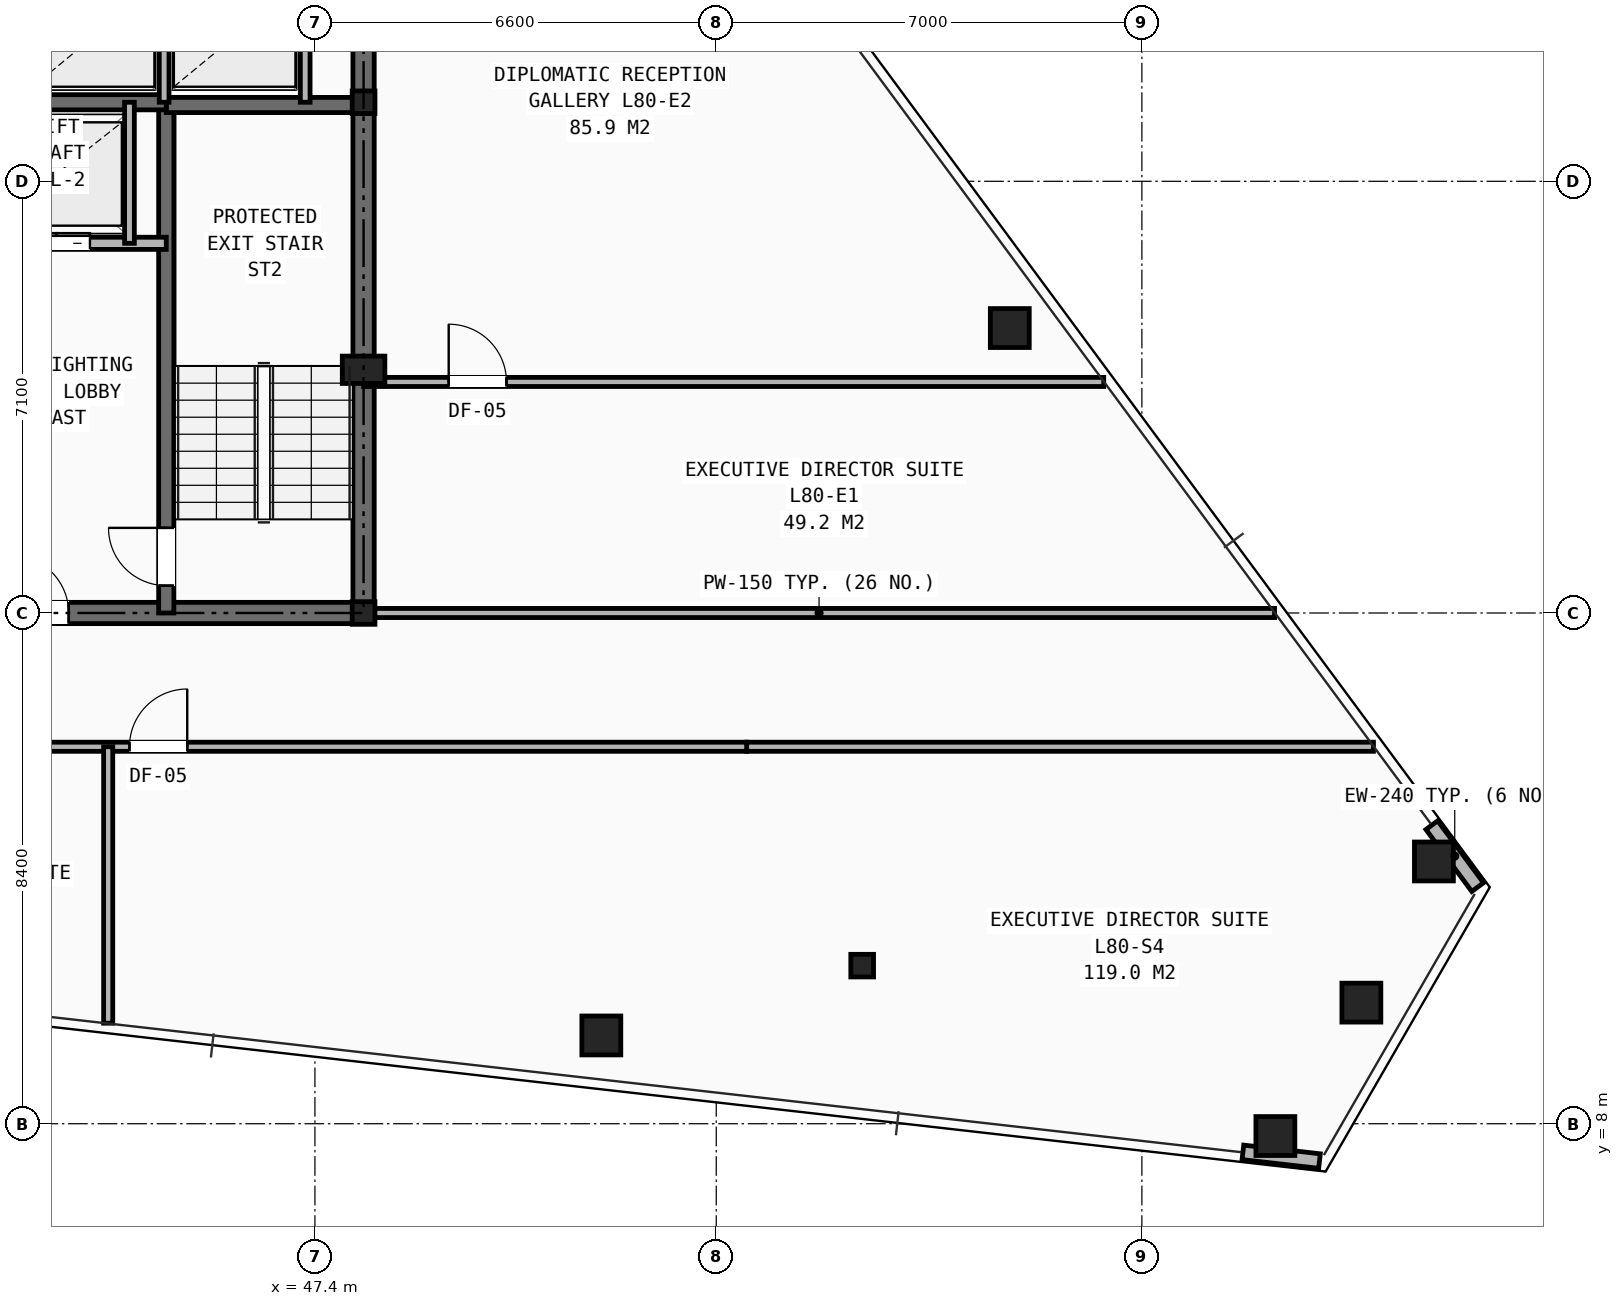
"""IFC4 building model, lengths in metres.
Left out: names, types, materials, properties, quantities, classifications, styles, units other than length and angle.
Written with IfcOpenShell. Run it as: python <this file> out.ifc"""

import sys

from ifc_helpers import new_model, si_unit, direction, frame, frame_2d, origin, origin_2d, place, context, subcontext, project, spatial, rectangle, hollow_rectangle, i_section, extrude, element, fill, save


model = new_model("IFC4")
c1 = context("Model", 3, precision=1e-05, world=origin(), true_north=direction((0.0, 1.0)))
c2 = subcontext(c1, "Body", "Model", "MODEL_VIEW")
j1 = project(units=[si_unit("LENGTHUNIT", "METRE"), si_unit("PLANEANGLEUNIT", "RADIAN")], contexts=[c1])
p1 = place(None, origin())
s1 = spatial("IfcSite", under=j1, at=p1, CompositionType="ELEMENT")
p2 = place(p1, origin())
s2 = spatial("IfcBuilding", under=s1, at=p2, CompositionType="ELEMENT")
p3 = place(p2, frame((0.0, 0.0, 283.0)))
s3 = spatial("IfcBuildingStorey", under=s2, at=p3, CompositionType="ELEMENT", Elevation=283.0)
for number, where, z_axis, x_axis in (
    (1, (48.2, 16.4, 0.0), (0.0, 0.0, 1.0), (1.0, 0.0, 0.0)),
    (2, (48.2, 24.8, 0.0), (0.0, 0.0, 1.0), (1.0, 0.0, 0.0)),
    (3, (56.4, 10.6, 0.0), (0.0, 0.0, 1.0), (1.0, 0.0, 0.0)),
):
    element("IfcColumn", number, at=place(p3, frame(where, z_axis=z_axis, x_axis=x_axis)), inside=s3, PredefinedType="COLUMN", context=c2, shape_type="SweptSolid", body=[
        extrude(i_section(OverallWidth=0.374, OverallDepth=0.372, WebThickness=0.016, FlangeThickness=0.026, at=origin_2d()), origin(), (0.0, 0.0, 1.0), 3.5),
    ])
p4 = place(p3, frame((48.2, 20.4, 0.0), z_axis=(0.0, 0.0, 1.0), x_axis=(1.0, 0.0, 0.0)))
e4 = element("IfcColumn", 4, at=p4, inside=s3, PredefinedType="PILASTER", context=c2, shape_type="SweptSolid", body=[
    extrude(rectangle(XDim=0.7, YDim=0.45, at=origin_2d()), origin(), (0.0, 0.0, 1.0), 3.5),
])
for number, where, z_axis, x_axis in (
    (5, (52.11, 9.452, 0.0), (0.0, 0.0, 1.0), (1.0, 0.0, 0.0)),
    (6, (63.195, 7.798, 0.0), (0.0, 0.0, 1.0), (1.0, 0.0, 0.0)),
    (7, (64.61, 9.992, 0.0), (0.0, 0.0, 1.0), (1.0, 0.0, 0.0)),
    (8, (65.802, 12.313, 0.0), (0.0, 0.0, 1.0), (1.0, 0.0, 0.0)),
    (9, (58.827, 21.086, 0.0), (0.0, 0.0, 1.0), (1.0, 0.0, 0.0)),
):
    element("IfcColumn", number, at=place(p3, frame(where, z_axis=z_axis, x_axis=x_axis)), inside=s3, PredefinedType="COLUMN", context=c2, shape_type="SweptSolid", body=[
        extrude(hollow_rectangle(XDim=0.64, YDim=0.64, WallThickness=0.045, at=origin_2d()), origin(), (0.0, 0.0, 1.0), 3.5),
    ])
p5 = place(p3, frame((62.661, 7.529, 0.0), z_axis=(0.0, 0.0, 1.0), x_axis=(0.993610655419, -0.11286215237, 0.0)))
e10 = element("IfcWall", 10, at=p5, inside=s3, PredefinedType="SHEAR", context=c2, shape_type="SweptSolid", body=[
    extrude(rectangle(XDim=1.268, YDim=0.24, at=frame_2d((0.634, 0.0))), origin(), (0.0, 0.0, 1.0), 2.623),
])
p6 = place(p3, frame((66.522, 11.891, 0.0), z_axis=(0.0, 0.0, 1.0), x_axis=(-0.594499388503, 0.804096062091, 0.0)))
e11 = element("IfcWall", 11, at=p6, inside=s3, PredefinedType="SHEAR", context=c2, shape_type="SweptSolid", body=[
    extrude(rectangle(XDim=1.267, YDim=0.24, at=frame_2d((0.634, 0.0))), origin(), (0.0, 0.0, 1.0), 2.623),
])
p7 = place(p3, frame((31.8, 16.4, 0.0), z_axis=(0.0, 0.0, 1.0), x_axis=(1.0, 0.0, 0.0)))
e12 = element("IfcWall", 12, at=p7, inside=s3, PredefinedType="SHEAR", context=c2, shape_type="SweptSolid", body=[
    extrude(rectangle(XDim=16.4, YDim=0.35, at=frame_2d((8.2, 0.0))), origin(), (0.0, 0.0, 1.0), 3.25),
])
p8 = place(p7, frame((7.75, 0.0, 0.0)))
e13 = element("IfcOpeningElement", 13, at=p8, cuts=e12, PredefinedType="OPENING", context=c2, shape_type="SweptSolid", body=[
    extrude(rectangle(XDim=0.9, YDim=2.1, at=frame_2d((0.45, 1.05))), frame((0.0, 0.185, 0.0), z_axis=(0.0, -1.0, 0.0), x_axis=(1.0, 0.0, 0.0)), (0.0, 0.0, 1.0), 0.37),
])
p9 = place(p7, frame((4.2, 0.0, 0.0)))
e14 = element("IfcOpeningElement", 14, at=p9, cuts=e12, PredefinedType="OPENING", context=c2, shape_type="SweptSolid", body=[
    extrude(rectangle(XDim=0.95, YDim=2.1, at=frame_2d((0.475, 1.05))), frame((0.0, 0.185, 0.0), z_axis=(0.0, -1.0, 0.0), x_axis=(1.0, 0.0, 0.0)), (0.0, 0.0, 1.0), 0.37),
])
p10 = place(p7, frame((10.6, 0.0, 0.0)))
e15 = element("IfcOpeningElement", 15, at=p10, cuts=e12, PredefinedType="OPENING", context=c2, shape_type="SweptSolid", body=[
    extrude(rectangle(XDim=0.95, YDim=2.1, at=frame_2d((0.475, 1.05))), frame((0.0, 0.185, 0.0), z_axis=(0.0, -1.0, 0.0), x_axis=(1.0, 0.0, 0.0)), (0.0, 0.0, 1.0), 0.37),
])
p11 = place(p3, frame((48.2, 16.4, 0.0), z_axis=(0.0, 0.0, 1.0), x_axis=(0.0, 1.0, 0.0)))
e16 = element("IfcWall", 16, at=p11, inside=s3, PredefinedType="SHEAR", context=c2, shape_type="SweptSolid", body=[
    extrude(rectangle(XDim=14.8, YDim=0.35, at=frame_2d((7.4, 0.0))), origin(), (0.0, 0.0, 1.0), 3.25),
])
p12 = place(p11, frame((11.0, 0.0, 0.0)))
e17 = element("IfcOpeningElement", 17, at=p12, cuts=e16, PredefinedType="OPENING", context=c2, shape_type="SweptSolid", body=[
    extrude(rectangle(XDim=1.1, YDim=2.15, at=frame_2d((0.55, 1.075))), frame((0.0, 0.185, 0.0), z_axis=(0.0, -1.0, 0.0), x_axis=(1.0, 0.0, 0.0)), (0.0, 0.0, 1.0), 0.37),
])
p13 = place(p3, frame((44.955, 16.4, 0.0), z_axis=(0.0, 0.0, 1.0), x_axis=(0.0, 1.0, 0.0)))
e18 = element("IfcWall", 18, at=p13, inside=s3, PredefinedType="SHEAR", context=c2, shape_type="SweptSolid", body=[
    extrude(rectangle(XDim=8.4, YDim=0.25, at=frame_2d((4.2, 0.0))), origin(), (0.0, 0.0, 1.0), 3.25),
])
p14 = place(p13, frame((0.45, 0.0, 0.0)))
e19 = element("IfcOpeningElement", 19, at=p14, cuts=e18, PredefinedType="OPENING", context=c2, shape_type="SweptSolid", body=[
    extrude(rectangle(XDim=0.95, YDim=2.1, at=frame_2d((0.475, 1.05))), frame((0.0, 0.135, 0.0), z_axis=(0.0, -1.0, 0.0), x_axis=(1.0, 0.0, 0.0)), (0.0, 0.0, 1.0), 0.27),
])
p15 = place(p3, frame((44.955, 24.755, 0.0), z_axis=(0.0, 0.0, 1.0), x_axis=(1.0, 0.0, 0.0)))
e20 = element("IfcWall", 20, at=p15, inside=s3, PredefinedType="SHEAR", context=c2, shape_type="SweptSolid", body=[
    extrude(rectangle(XDim=3.245, YDim=0.25, at=frame_2d((1.623, 0.0))), origin(), (0.0, 0.0, 1.0), 3.25),
])
p16 = place(p3, frame((35.045, 24.8, 0.0), z_axis=(0.0, 0.0, 1.0), x_axis=(1.0, 0.0, 0.0)))
e21 = element("IfcWall", 21, at=p16, inside=s3, PredefinedType="SHEAR", context=c2, shape_type="SweptSolid", body=[
    extrude(rectangle(XDim=9.91, YDim=0.25, at=frame_2d((4.955, 0.0))), origin(), (0.0, 0.0, 1.0), 3.25),
])
p17 = place(p3, frame((35.045, 22.48, 0.0), z_axis=(0.0, 0.0, 1.0), x_axis=(1.0, 0.0, 0.0)))
e22 = element("IfcWall", 22, at=p17, inside=s3, PredefinedType="SOLIDWALL", context=c2, shape_type="SweptSolid", body=[
    extrude(rectangle(XDim=9.91, YDim=0.2, at=frame_2d((4.955, 0.0))), origin(), (0.0, 0.0, 1.0), 3.25),
])
p18 = place(p17, frame((1.255, 0.0, 0.0)))
e23 = element("IfcOpeningElement", 23, at=p18, cuts=e22, PredefinedType="OPENING", context=c2, shape_type="SweptSolid", body=[
    extrude(rectangle(XDim=1.1, YDim=2.15, at=frame_2d((0.55, 1.075))), frame((0.0, 0.11, 0.0), z_axis=(0.0, -1.0, 0.0), x_axis=(1.0, 0.0, 0.0)), (0.0, 0.0, 1.0), 0.22),
])
p19 = place(p17, frame((7.555, 0.0, 0.0)))
e24 = element("IfcOpeningElement", 24, at=p19, cuts=e22, PredefinedType="OPENING", context=c2, shape_type="SweptSolid", body=[
    extrude(rectangle(XDim=1.1, YDim=2.15, at=frame_2d((0.55, 1.075))), frame((0.0, 0.11, 0.0), z_axis=(0.0, -1.0, 0.0), x_axis=(1.0, 0.0, 0.0)), (0.0, 0.0, 1.0), 0.22),
])
p20 = place(p17, frame((4.405, 0.0, 0.0)))
e25 = element("IfcOpeningElement", 25, at=p20, cuts=e22, PredefinedType="OPENING", context=c2, shape_type="SweptSolid", body=[
    extrude(rectangle(XDim=1.1, YDim=2.15, at=frame_2d((0.55, 1.075))), frame((0.0, 0.11, 0.0), z_axis=(0.0, -1.0, 0.0), x_axis=(1.0, 0.0, 0.0)), (0.0, 0.0, 1.0), 0.22),
])
p21 = place(p3, frame((44.35, 22.48, 0.0), z_axis=(0.0, 0.0, 1.0), x_axis=(0.0, 1.0, 0.0)))
e26 = element("IfcWall", 26, at=p21, inside=s3, PredefinedType="SOLIDWALL", context=c2, shape_type="SweptSolid", body=[
    extrude(rectangle(XDim=2.32, YDim=0.16, at=frame_2d((1.16, 0.0))), origin(), (0.0, 0.0, 1.0), 3.25),
])
for number, where, z_axis, x_axis in (
    (27, (44.92, 24.8, 0.0), (0.0, 0.0, 1.0), (0.0, 1.0, 0.0)),
    (28, (47.24, 24.8, 0.0), (0.0, 0.0, 1.0), (0.0, 1.0, 0.0)),
):
    element("IfcWall", number, at=place(p3, frame(where, z_axis=z_axis, x_axis=x_axis)), inside=s3, PredefinedType="SOLIDWALL", context=c2, shape_type="SweptSolid", body=[
        extrude(rectangle(XDim=2.08, YDim=0.16, at=frame_2d((1.04, 0.0))), origin(), (0.0, 0.0, 1.0), 3.25),
    ])
p22 = place(p3, frame((54.5, 14.2, 0.0), z_axis=(0.0, 0.0, 1.0), x_axis=(1.0, 0.0, 0.0)))
e29 = element("IfcWall", 29, at=p22, inside=s3, PredefinedType="PARTITIONING", context=c2, shape_type="SweptSolid", body=[
    extrude(rectangle(XDim=10.308, YDim=0.15, at=frame_2d((5.154, 0.0))), origin(), (0.0, 0.0, 1.0), 2.265),
])
p23 = place(p3, frame((48.2, 16.4, 0.0), z_axis=(0.0, 0.0, 1.0), x_axis=(1.0, 0.0, 0.0)))
e30 = element("IfcWall", 30, at=p23, inside=s3, PredefinedType="PARTITIONING", context=c2, shape_type="SweptSolid", body=[
    extrude(rectangle(XDim=14.982, YDim=0.15, at=frame_2d((7.491, 0.0))), origin(), (0.0, 0.0, 1.0), 2.265),
])
p24 = place(p3, frame((25.5, 14.2, 0.0), z_axis=(0.0, 0.0, 1.0), x_axis=(1.0, 0.0, 0.0)))
e31 = element("IfcWall", 31, at=p24, inside=s3, PredefinedType="PARTITIONING", context=c2, shape_type="SweptSolid", body=[
    extrude(rectangle(XDim=29.0, YDim=0.15, at=frame_2d((14.5, 0.0))), origin(), (0.0, 0.0, 1.0), 2.265),
])
p25 = place(p24, frame((0.85, 0.0, 0.0)))
e32 = element("IfcOpeningElement", 32, at=p25, cuts=e31, PredefinedType="OPENING", context=c2, shape_type="SweptSolid", body=[
    extrude(rectangle(XDim=0.95, YDim=2.1, at=frame_2d((0.475, 1.05))), frame((0.0, 0.085, 0.0), z_axis=(0.0, -1.0, 0.0), x_axis=(1.0, 0.0, 0.0)), (0.0, 0.0, 1.0), 0.17),
])
p26 = place(p24, frame((9.05, 0.0, 0.0)))
e33 = element("IfcOpeningElement", 33, at=p26, cuts=e31, PredefinedType="OPENING", context=c2, shape_type="SweptSolid", body=[
    extrude(rectangle(XDim=0.95, YDim=2.1, at=frame_2d((0.475, 1.05))), frame((0.0, 0.085, 0.0), z_axis=(0.0, -1.0, 0.0), x_axis=(1.0, 0.0, 0.0)), (0.0, 0.0, 1.0), 0.17),
])
p27 = place(p24, frame((14.45, 0.0, 0.0)))
e34 = element("IfcOpeningElement", 34, at=p27, cuts=e31, PredefinedType="OPENING", context=c2, shape_type="SweptSolid", body=[
    extrude(rectangle(XDim=0.95, YDim=2.1, at=frame_2d((0.475, 1.05))), frame((0.0, 0.085, 0.0), z_axis=(0.0, -1.0, 0.0), x_axis=(1.0, 0.0, 0.0)), (0.0, 0.0, 1.0), 0.17),
])
p28 = place(p24, frame((18.85, 0.0, 0.0)))
e35 = element("IfcOpeningElement", 35, at=p28, cuts=e31, PredefinedType="OPENING", context=c2, shape_type="SweptSolid", body=[
    extrude(rectangle(XDim=0.95, YDim=2.1, at=frame_2d((0.475, 1.05))), frame((0.0, 0.085, 0.0), z_axis=(0.0, -1.0, 0.0), x_axis=(1.0, 0.0, 0.0)), (0.0, 0.0, 1.0), 0.17),
])
p29 = place(p3, frame((44.0, 9.653, 0.0), z_axis=(0.0, 0.0, 1.0), x_axis=(0.0, 1.0, 0.0)))
e36 = element("IfcWall", 36, at=p29, inside=s3, PredefinedType="PARTITIONING", context=c2, shape_type="SweptSolid", body=[
    extrude(rectangle(XDim=4.547, YDim=0.15, at=frame_2d((2.273, 0.0))), origin(), (0.0, 0.0, 1.0), 2.628),
])
p30 = place(p3, frame((48.2, 20.2, 0.0), z_axis=(0.0, 0.0, 1.0), x_axis=(1.0, 0.0, 0.0)))
e37 = element("IfcWall", 37, at=p30, inside=s3, PredefinedType="PARTITIONING", context=c2, shape_type="SweptSolid", body=[
    extrude(rectangle(XDim=12.172, YDim=0.15, at=frame_2d((6.086, 0.0))), origin(), (0.0, 0.0, 1.0), 2.265),
])
p31 = place(p30, frame((1.4, 0.0, 0.0)))
e38 = element("IfcOpeningElement", 38, at=p31, cuts=e37, PredefinedType="OPENING", context=c2, shape_type="SweptSolid", body=[
    extrude(rectangle(XDim=0.95, YDim=2.1, at=frame_2d((0.475, 1.05))), frame((0.0, 0.085, 0.0), z_axis=(0.0, -1.0, 0.0), x_axis=(1.0, 0.0, 0.0)), (0.0, 0.0, 1.0), 0.17),
])
p32 = place(p14, origin())
e39 = element("IfcDoor", 39, at=p32, inside=s3, OperationType="SINGLE_SWING_RIGHT", PredefinedType="DOOR", context=c2, shape_type="SweptSolid", body=[
    extrude(rectangle(XDim=0.95, YDim=2.1, at=frame_2d((0.475, 1.05))), frame((0.0, 0.025, 0.0), z_axis=(0.0, -1.0, 0.0), x_axis=(1.0, 0.0, 0.0)), (0.0, 0.0, 1.0), 0.05),
])
fill(e19, e39)
p33 = place(p10, origin())
e40 = element("IfcDoor", 40, at=p33, inside=s3, OperationType="SINGLE_SWING_LEFT", PredefinedType="DOOR", context=c2, shape_type="SweptSolid", body=[
    extrude(rectangle(XDim=0.95, YDim=2.1, at=frame_2d((0.475, 1.05))), frame((0.0, 0.025, 0.0), z_axis=(0.0, -1.0, 0.0), x_axis=(1.0, 0.0, 0.0)), (0.0, 0.0, 1.0), 0.05),
])
fill(e15, e40)
p34 = place(p19, origin())
e41 = element("IfcDoor", 41, at=p34, inside=s3, OperationType="DOUBLE_DOOR_SLIDING", PredefinedType="DOOR", context=c2, shape_type="SweptSolid", body=[
    extrude(rectangle(XDim=1.1, YDim=2.15, at=frame_2d((0.55, 1.075))), frame((0.0, 0.025, 0.0), z_axis=(0.0, -1.0, 0.0), x_axis=(1.0, 0.0, 0.0)), (0.0, 0.0, 1.0), 0.05),
])
fill(e24, e41)
p35 = place(p28, origin())
e42 = element("IfcDoor", 42, at=p35, inside=s3, OperationType="SINGLE_SWING_RIGHT", PredefinedType="DOOR", context=c2, shape_type="SweptSolid", body=[
    extrude(rectangle(XDim=0.95, YDim=2.1, at=frame_2d((0.475, 1.05))), frame((0.0, 0.025, 0.0), z_axis=(0.0, -1.0, 0.0), x_axis=(1.0, 0.0, 0.0)), (0.0, 0.0, 1.0), 0.05),
])
fill(e35, e42)
p36 = place(p31, origin())
e43 = element("IfcDoor", 43, at=p36, inside=s3, OperationType="SINGLE_SWING_LEFT", PredefinedType="DOOR", context=c2, shape_type="SweptSolid", body=[
    extrude(rectangle(XDim=0.95, YDim=2.1, at=frame_2d((0.475, 1.05))), frame((0.0, 0.025, 0.0), z_axis=(0.0, -1.0, 0.0), x_axis=(1.0, 0.0, 0.0)), (0.0, 0.0, 1.0), 0.05),
])
fill(e38, e43)
save(model, sys.argv[1])
